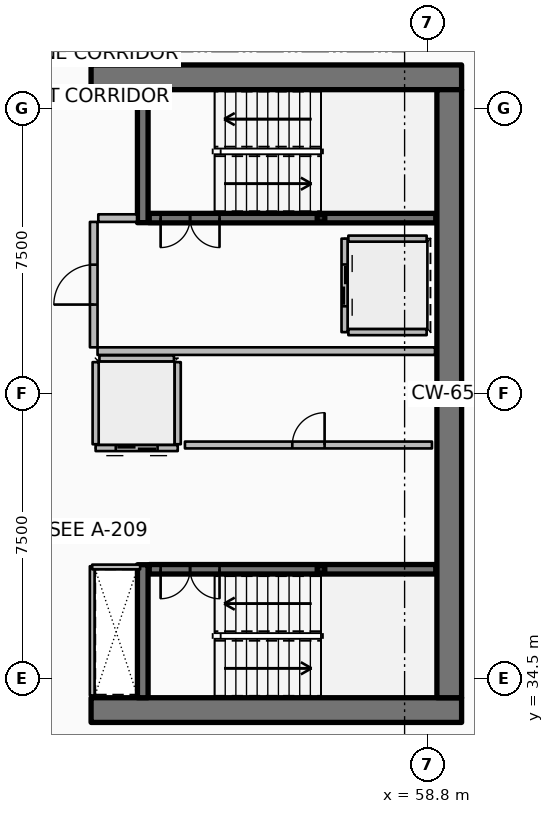
"""IFC4 building model, lengths in metres.
Left out: names, types, materials, properties, quantities, classifications, styles, units other than length and angle.
Written with IfcOpenShell. Run it as: python <this file> out.ifc"""

import sys

from ifc_helpers import new_model, si_unit, direction, frame, frame_2d, origin, origin_2d, place, context, subcontext, project, spatial, rectangle, hollow_rectangle, extrude, element, fill, save


model = new_model("IFC4")
c1 = context("Model", 3, precision=1e-05, world=origin(), true_north=direction((0.0, 1.0)))
c2 = subcontext(c1, "Body", "Model", "MODEL_VIEW")
j1 = project(units=[si_unit("LENGTHUNIT", "METRE"), si_unit("PLANEANGLEUNIT", "RADIAN")], contexts=[c1])
p1 = place(None, origin())
s1 = spatial("IfcSite", under=j1, at=p1, CompositionType="ELEMENT")
p2 = place(p1, origin())
s2 = spatial("IfcBuilding", under=s1, at=p2, CompositionType="ELEMENT")
p3 = place(p2, frame((0.0, 0.0, 202.8)))
s3 = spatial("IfcBuildingStorey", under=s2, at=p3, CompositionType="ELEMENT", Elevation=202.8)
for number, where, z_axis, x_axis in (
    (1, (49.95, 33.675, 0.0), (0.0, 0.0, 1.0), (1.0, 0.0, 0.0)),
    (2, (49.95, 50.325, 0.0), (0.0, 0.0, 1.0), (1.0, 0.0, 0.0)),
):
    element("IfcWall", number, at=place(p3, frame(where, z_axis=z_axis, x_axis=x_axis)), inside=s3, PredefinedType="SHEAR", context=c2, shape_type="SweptSolid", body=[
        extrude(rectangle(XDim=9.75, YDim=0.65, at=frame_2d((4.875, 0.0))), origin(), (0.0, 0.0, 1.0), 3.75),
    ])
p4 = place(p3, frame((59.375, 34.0, 0.0), z_axis=(0.0, 0.0, 1.0), x_axis=(0.0, 1.0, 0.0)))
e3 = element("IfcWall", 3, at=p4, inside=s3, PredefinedType="SHEAR", context=c2, shape_type="SweptSolid", body=[
    extrude(rectangle(XDim=16.0, YDim=0.65, at=frame_2d((8.0, 0.0))), origin(), (0.0, 0.0, 1.0), 3.75),
])
for number, where, z_axis, x_axis in (
    (4, (51.31, 46.5, 0.0), (0.0, 0.0, 1.0), (0.0, 1.0, 0.0)),
    (5, (51.31, 34.0, 0.0), (0.0, 0.0, 1.0), (0.0, 1.0, 0.0)),
):
    element("IfcWall", number, at=place(p3, frame(where, z_axis=z_axis, x_axis=x_axis)), inside=s3, PredefinedType="SHEAR", context=c2, shape_type="SweptSolid", body=[
        extrude(rectangle(XDim=3.5, YDim=0.28, at=frame_2d((1.75, 0.0))), origin(), (0.0, 0.0, 1.0), 3.75),
    ])
for number, where, z_axis, x_axis in (
    (6, (56.0, 46.62, 0.0), (0.0, 0.0, 1.0), (1.0, 0.0, 0.0)),
    (7, (56.0, 37.38, 0.0), (0.0, 0.0, 1.0), (1.0, 0.0, 0.0)),
):
    element("IfcColumn", number, at=place(p3, frame(where, z_axis=z_axis, x_axis=x_axis)), inside=s3, PredefinedType="COLUMN", context=c2, shape_type="SweptSolid", body=[
        extrude(hollow_rectangle(XDim=0.2, YDim=0.2, WallThickness=0.01, InnerFilletRadius=0.01, OuterFilletRadius=0.02, at=origin_2d()), origin(), (0.0, 0.0, 1.0), 1.67),
    ])
p5 = place(p3, frame((51.48, 46.62, 0.0), z_axis=(0.0, 0.0, 1.0), x_axis=(1.0, 0.0, 0.0)))
e8 = element("IfcWall", 8, at=p5, inside=s3, PredefinedType="SOLIDWALL", context=c2, shape_type="SweptSolid", body=[
    extrude(rectangle(XDim=7.54, YDim=0.25, at=frame_2d((3.77, 0.0))), origin(), (0.0, 0.0, 1.0), 3.5),
])
p6 = place(p5, frame((0.3, 0.0, 0.0)))
e9 = element("IfcOpeningElement", 9, at=p6, cuts=e8, PredefinedType="OPENING", context=c2, shape_type="SweptSolid", body=[
    extrude(rectangle(XDim=1.55, YDim=2.15, at=frame_2d((0.775, 1.075))), frame((0.0, 0.135, 0.0), z_axis=(0.0, -1.0, 0.0), x_axis=(1.0, 0.0, 0.0)), (0.0, 0.0, 1.0), 0.27),
])
p7 = place(p3, frame((51.48, 37.38, 0.0), z_axis=(0.0, 0.0, 1.0), x_axis=(1.0, 0.0, 0.0)))
e10 = element("IfcWall", 10, at=p7, inside=s3, PredefinedType="SOLIDWALL", context=c2, shape_type="SweptSolid", body=[
    extrude(rectangle(XDim=7.54, YDim=0.25, at=frame_2d((3.77, 0.0))), origin(), (0.0, 0.0, 1.0), 3.5),
])
p8 = place(p7, frame((0.3, 0.0, 0.0)))
e11 = element("IfcOpeningElement", 11, at=p8, cuts=e10, PredefinedType="OPENING", context=c2, shape_type="SweptSolid", body=[
    extrude(rectangle(XDim=1.55, YDim=2.15, at=frame_2d((0.775, 1.075))), frame((0.0, 0.135, 0.0), z_axis=(0.0, -1.0, 0.0), x_axis=(1.0, 0.0, 0.0)), (0.0, 0.0, 1.0), 0.27),
])
p9 = place(p3, frame((56.62, 46.08, 0.0), z_axis=(0.0, 0.0, 1.0), x_axis=(0.0, -1.0, 0.0)))
e12 = element("IfcWall", 12, at=p9, inside=s3, PredefinedType="PARTITIONING", context=c2, shape_type="SweptSolid", body=[
    extrude(rectangle(XDim=2.46, YDim=0.16, at=frame_2d((1.23, 0.0))), origin(), (0.0, 0.0, 1.0), 3.5),
])
p10 = place(p9, frame((0.68, 0.0, 0.0)))
e13 = element("IfcOpeningElement", 13, at=p10, cuts=e12, PredefinedType="OPENING", context=c2, shape_type="SweptSolid", body=[
    extrude(rectangle(XDim=1.1, YDim=2.1, at=frame_2d((0.55, 1.05))), frame((0.0, 0.09, 0.0), z_axis=(0.0, -1.0, 0.0), x_axis=(1.0, 0.0, 0.0)), (0.0, 0.0, 1.0), 0.18),
])
for number, where, z_axis, x_axis in (
    (14, (56.72, 46.08, 0.0), (0.0, 0.0, 1.0), (1.0, 0.0, 0.0)),
    (15, (56.72, 43.62, 0.0), (0.0, 0.0, 1.0), (1.0, 0.0, 0.0)),
):
    element("IfcWall", number, at=place(p3, frame(where, z_axis=z_axis, x_axis=x_axis)), inside=s3, PredefinedType="PARTITIONING", context=c2, shape_type="SweptSolid", body=[
        extrude(rectangle(XDim=2.06, YDim=0.16, at=frame_2d((1.03, 0.0))), origin(), (0.0, 0.0, 1.0), 3.5),
    ])
p11 = place(p3, frame((52.23, 40.57, 0.0), z_axis=(0.0, 0.0, 1.0), x_axis=(-1.0, 0.0, 0.0)))
e16 = element("IfcWall", 16, at=p11, inside=s3, PredefinedType="PARTITIONING", context=c2, shape_type="SweptSolid", body=[
    extrude(rectangle(XDim=2.16, YDim=0.16, at=frame_2d((1.08, 0.0))), origin(), (0.0, 0.0, 1.0), 3.5),
])
p12 = place(p11, frame((0.53, 0.0, 0.0)))
e17 = element("IfcOpeningElement", 17, at=p12, cuts=e16, PredefinedType="OPENING", context=c2, shape_type="SweptSolid", body=[
    extrude(rectangle(XDim=1.1, YDim=2.1, at=frame_2d((0.55, 1.05))), frame((0.0, 0.09, 0.0), z_axis=(0.0, -1.0, 0.0), x_axis=(1.0, 0.0, 0.0)), (0.0, 0.0, 1.0), 0.18),
])
for number, where, z_axis, x_axis in (
    (18, (52.23, 40.67, 0.0), (0.0, 0.0, 1.0), (0.0, 1.0, 0.0)),
    (19, (50.07, 40.67, 0.0), (0.0, 0.0, 1.0), (0.0, 1.0, 0.0)),
):
    element("IfcWall", number, at=place(p3, frame(where, z_axis=z_axis, x_axis=x_axis)), inside=s3, PredefinedType="PARTITIONING", context=c2, shape_type="SweptSolid", body=[
        extrude(rectangle(XDim=2.16, YDim=0.16, at=frame_2d((1.08, 0.0))), origin(), (0.0, 0.0, 1.0), 3.5),
    ])
p13 = place(p3, frame((50.17, 42.93, 0.0), z_axis=(0.0, 0.0, 1.0), x_axis=(1.0, 0.0, 0.0)))
e20 = element("IfcWall", 20, at=p13, inside=s3, PredefinedType="PARTITIONING", context=c2, shape_type="SweptSolid", body=[
    extrude(rectangle(XDim=1.96, YDim=0.16, at=frame_2d((0.98, 0.0))), origin(), (0.0, 0.0, 1.0), 3.5),
])
p14 = place(p3, frame((52.42, 40.65, 0.0), z_axis=(0.0, 0.0, 1.0), x_axis=(1.0, 0.0, 0.0)))
e21 = element("IfcWall", 21, at=p14, inside=s3, PredefinedType="PARTITIONING", context=c2, shape_type="SweptSolid", body=[
    extrude(rectangle(XDim=6.5, YDim=0.18, at=frame_2d((3.25, 0.0))), origin(), (0.0, 0.0, 1.0), 3.5),
])
p15 = place(p14, frame((2.825, 0.0, 0.0)))
e22 = element("IfcOpeningElement", 22, at=p15, cuts=e21, PredefinedType="OPENING", context=c2, shape_type="SweptSolid", body=[
    extrude(rectangle(XDim=0.85, YDim=2.06, at=frame_2d((0.425, 1.03))), frame((0.0, 0.1, 0.0), z_axis=(0.0, -1.0, 0.0), x_axis=(1.0, 0.0, 0.0)), (0.0, 0.0, 1.0), 0.2),
])
p16 = place(p3, frame((50.12, 43.12, 0.0), z_axis=(0.0, 0.0, 1.0), x_axis=(1.0, 0.0, 0.0)))
e23 = element("IfcWall", 23, at=p16, inside=s3, PredefinedType="PARTITIONING", context=c2, shape_type="SweptSolid", body=[
    extrude(rectangle(XDim=8.88, YDim=0.2, at=frame_2d((4.44, 0.0))), origin(), (0.0, 0.0, 1.0), 3.5),
])
p17 = place(p3, frame((50.14, 46.62, 0.0), z_axis=(0.0, 0.0, 1.0), x_axis=(1.0, 0.0, 0.0)))
e24 = element("IfcWall", 24, at=p17, inside=s3, PredefinedType="PARTITIONING", context=c2, shape_type="SweptSolid", body=[
    extrude(rectangle(XDim=1.02, YDim=0.2, at=frame_2d((0.51, 0.0))), origin(), (0.0, 0.0, 1.0), 3.5),
])
p18 = place(p3, frame((50.02, 43.22, 0.0), z_axis=(0.0, 0.0, 1.0), x_axis=(0.0, 1.0, 0.0)))
e25 = element("IfcWall", 25, at=p18, inside=s3, PredefinedType="PARTITIONING", context=c2, shape_type="SweptSolid", body=[
    extrude(rectangle(XDim=3.3, YDim=0.2, at=frame_2d((1.65, 0.0))), origin(), (0.0, 0.0, 1.0), 3.5),
])
p19 = place(p18, frame((1.125, 0.0, 0.0)))
e26 = element("IfcOpeningElement", 26, at=p19, cuts=e25, PredefinedType="OPENING", context=c2, shape_type="SweptSolid", body=[
    extrude(rectangle(XDim=1.05, YDim=2.1, at=frame_2d((0.525, 1.05))), frame((0.0, 0.11, 0.0), z_axis=(0.0, -1.0, 0.0), x_axis=(1.0, 0.0, 0.0)), (0.0, 0.0, 1.0), 0.22),
])
p20 = place(p3, frame((49.98, 34.06, 0.0), z_axis=(0.0, 0.0, 1.0), x_axis=(0.0, 1.0, 0.0)))
e27 = element("IfcWall", 27, at=p20, inside=s3, PredefinedType="PARTITIONING", context=c2, shape_type="SweptSolid", body=[
    extrude(rectangle(XDim=3.4, YDim=0.125, at=frame_2d((1.7, 0.0))), origin(), (0.0, 0.0, 1.0), 2.94),
])
p21 = place(p3, frame((49.98, 37.44, 0.0), z_axis=(0.0, 0.0, 1.0), x_axis=(1.0, 0.0, 0.0)))
e28 = element("IfcWall", 28, at=p21, inside=s3, PredefinedType="PARTITIONING", context=c2, shape_type="SweptSolid", body=[
    extrude(rectangle(XDim=1.26, YDim=0.125, at=frame_2d((0.63, 0.0))), origin(), (0.0, 0.0, 1.0), 2.94),
])
p22 = place(p6, origin())
e29 = element("IfcDoor", 29, at=p22, inside=s3, OperationType="DOUBLE_DOOR_SINGLE_SWING", PredefinedType="DOOR", context=c2, shape_type="SweptSolid", body=[
    extrude(rectangle(XDim=1.55, YDim=2.15, at=frame_2d((0.775, 1.075))), frame((0.0, 0.025, 0.0), z_axis=(0.0, -1.0, 0.0), x_axis=(1.0, 0.0, 0.0)), (0.0, 0.0, 1.0), 0.05),
])
fill(e9, e29)
p23 = place(p8, origin())
e30 = element("IfcDoor", 30, at=p23, inside=s3, OperationType="DOUBLE_DOOR_SINGLE_SWING", PredefinedType="DOOR", context=c2, shape_type="SweptSolid", body=[
    extrude(rectangle(XDim=1.55, YDim=2.15, at=frame_2d((0.775, 1.075))), frame((0.0, 0.025, 0.0), z_axis=(0.0, -1.0, 0.0), x_axis=(1.0, 0.0, 0.0)), (0.0, 0.0, 1.0), 0.05),
])
fill(e11, e30)
p24 = place(p10, origin())
e31 = element("IfcDoor", 31, at=p24, inside=s3, OperationType="DOUBLE_DOOR_SLIDING", PredefinedType="DOOR", context=c2, shape_type="SweptSolid", body=[
    extrude(rectangle(XDim=1.1, YDim=2.1, at=frame_2d((0.55, 1.05))), frame((0.0, 0.025, 0.0), z_axis=(0.0, -1.0, 0.0), x_axis=(1.0, 0.0, 0.0)), (0.0, 0.0, 1.0), 0.05),
])
fill(e13, e31)
p25 = place(p12, origin())
e32 = element("IfcDoor", 32, at=p25, inside=s3, OperationType="DOUBLE_DOOR_SLIDING", PredefinedType="DOOR", context=c2, shape_type="SweptSolid", body=[
    extrude(rectangle(XDim=1.1, YDim=2.1, at=frame_2d((0.55, 1.05))), frame((0.0, 0.025, 0.0), z_axis=(0.0, -1.0, 0.0), x_axis=(1.0, 0.0, 0.0)), (0.0, 0.0, 1.0), 0.05),
])
fill(e17, e32)
p26 = place(p15, origin())
e33 = element("IfcDoor", 33, at=p26, inside=s3, OperationType="SINGLE_SWING_RIGHT", PredefinedType="DOOR", context=c2, shape_type="SweptSolid", body=[
    extrude(rectangle(XDim=0.85, YDim=2.06, at=frame_2d((0.425, 1.03))), frame((0.0, 0.025, 0.0), z_axis=(0.0, -1.0, 0.0), x_axis=(1.0, 0.0, 0.0)), (0.0, 0.0, 1.0), 0.05),
])
fill(e22, e33)
p27 = place(p19, origin())
e34 = element("IfcDoor", 34, at=p27, inside=s3, OperationType="SINGLE_SWING_LEFT", PredefinedType="DOOR", context=c2, shape_type="SweptSolid", body=[
    extrude(rectangle(XDim=1.05, YDim=2.1, at=frame_2d((0.525, 1.05))), frame((0.0, 0.025, 0.0), z_axis=(0.0, -1.0, 0.0), x_axis=(1.0, 0.0, 0.0)), (0.0, 0.0, 1.0), 0.05),
])
fill(e26, e34)
save(model, sys.argv[1])
